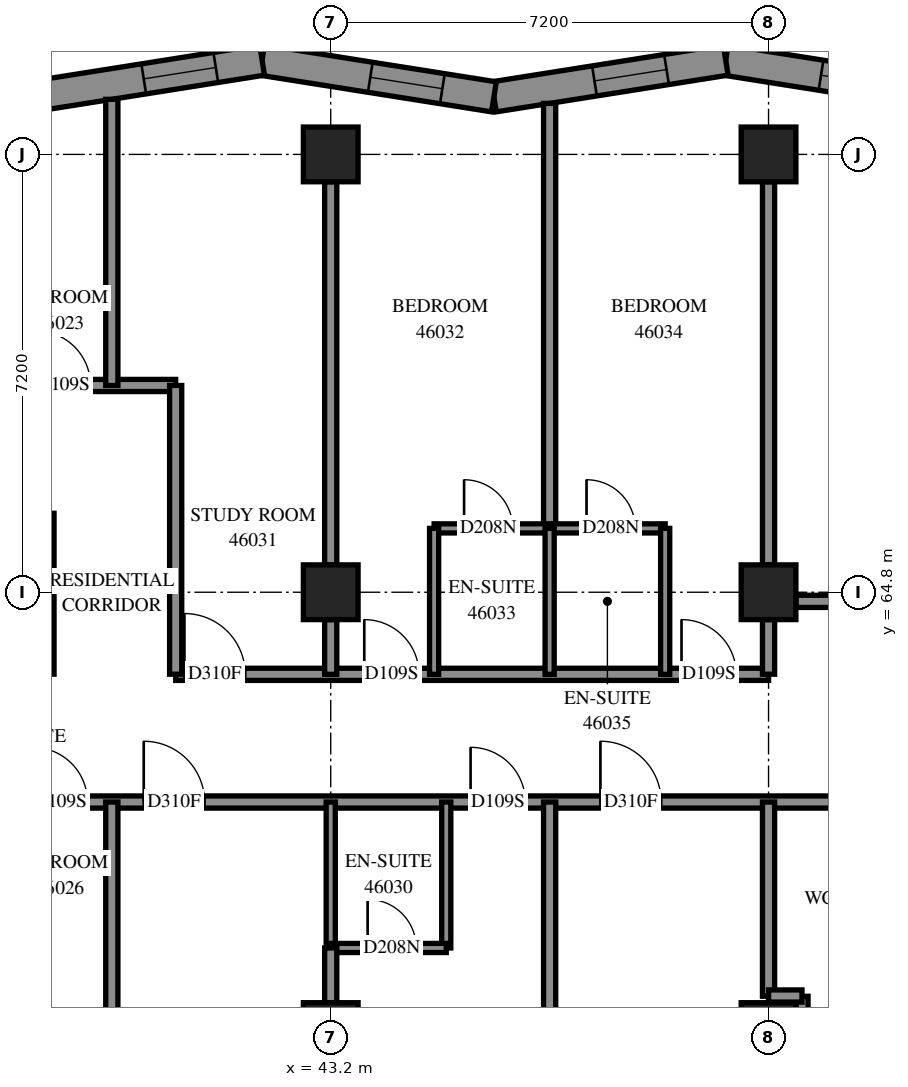
"""IFC4 building model, lengths in metres.
Left out: names, types, materials, properties, quantities, classifications, styles, units other than length and angle.
Written with IfcOpenShell. Run it as: python <this file> out.ifc"""

import sys

from ifc_helpers import new_model, si_unit, direction, frame, frame_2d, origin, origin_2d, place, context, subcontext, project, spatial, polyline, rectangle, outline, extrude, element, fill, save


model = new_model("IFC4")
c1 = context("Model", 3, precision=1e-05, world=origin(), true_north=direction((0.0, 1.0)))
c2 = subcontext(c1, "Body", "Model", "MODEL_VIEW")
j1 = project(units=[si_unit("LENGTHUNIT", "METRE"), si_unit("PLANEANGLEUNIT", "RADIAN")], contexts=[c1])
p1 = place(None, origin())
s1 = spatial("IfcSite", under=j1, at=p1, CompositionType="ELEMENT")
p2 = place(p1, origin())
s2 = spatial("IfcBuilding", under=s1, at=p2, CompositionType="ELEMENT")
p3 = place(p2, frame((0.0, 0.0, 169.4)))
s3 = spatial("IfcBuildingStorey", under=s2, at=p3, CompositionType="ELEMENT", Elevation=169.4)
for number, where, z_axis, x_axis in (
    (1, (43.2, 57.6, 0.0), (0.0, 0.0, 1.0), (1.0, 0.0, 0.0)),
    (2, (43.2, 64.8, 0.0), (0.0, 0.0, 1.0), (1.0, 0.0, 0.0)),
    (3, (43.2, 72.0, 0.0), (0.0, 0.0, 1.0), (1.0, 0.0, 0.0)),
    (4, (50.4, 57.6, 0.0), (0.0, 0.0, 1.0), (1.0, 0.0, 0.0)),
    (5, (50.4, 64.8, 0.0), (0.0, 0.0, 1.0), (1.0, 0.0, 0.0)),
    (6, (50.4, 72.0, 0.0), (0.0, 0.0, 1.0), (1.0, 0.0, 0.0)),
):
    element("IfcColumn", number, at=place(p3, frame(where, z_axis=z_axis, x_axis=x_axis)), inside=s3, PredefinedType="COLUMN", context=c2, shape_type="SweptSolid", body=[
        extrude(rectangle(XDim=0.9, YDim=0.9, at=origin_2d()), origin(), (0.0, 0.0, 1.0), 3.1),
    ])
p4 = place(p3, frame((53.509, 72.947, 0.0), z_axis=(0.0, 0.0, 1.0), x_axis=(-0.9877213372, 0.1562259905, 0.0)))
e7 = element("IfcWall", 7, at=p4, inside=s3, PredefinedType="SOLIDWALL", context=c2, shape_type="SweptSolid", body=[
    extrude(outline(polyline([(0.04, -0.25), (3.899, -0.25), (3.82, 0.25), (-0.04, 0.25), (0.04, -0.25)])), origin(), (0.0, 0.0, 1.0), 3.1),
])
p5 = place(p4, frame((1.074, 0.0, 0.45)))
e8 = element("IfcOpeningElement", 8, at=p5, cuts=e7, PredefinedType="OPENING", context=c2, shape_type="SweptSolid", body=[
    extrude(rectangle(XDim=1.2, YDim=2.5, at=frame_2d((0.6, 1.25))), frame((0.0, 0.26, 0.0), z_axis=(0.0, -1.0, 0.0), x_axis=(1.0, 0.0, 0.0)), (0.0, 0.0, 1.0), 0.52),
])
p6 = place(p3, frame((49.696, 73.55, 0.0), z_axis=(0.0, 0.0, 1.0), x_axis=(-0.9877213372, -0.1562259905, 0.0)))
e9 = element("IfcWall", 9, at=p6, inside=s3, PredefinedType="SOLIDWALL", context=c2, shape_type="SweptSolid", body=[
    extrude(outline(polyline([(-0.04, -0.25), (3.82, -0.25), (3.899, 0.25), (0.04, 0.25), (-0.04, -0.25)])), origin(), (0.0, 0.0, 1.0), 3.1),
])
p7 = place(p6, frame((0.986, 0.0, 0.45)))
e10 = element("IfcOpeningElement", 10, at=p7, cuts=e9, PredefinedType="OPENING", context=c2, shape_type="SweptSolid", body=[
    extrude(rectangle(XDim=1.2, YDim=2.5, at=frame_2d((0.6, 1.25))), frame((0.0, 0.26, 0.0), z_axis=(0.0, -1.0, 0.0), x_axis=(1.0, 0.0, 0.0)), (0.0, 0.0, 1.0), 0.52),
])
p8 = place(p3, frame((45.884, 72.947, 0.0), z_axis=(0.0, 0.0, 1.0), x_axis=(-0.9877213372, 0.1562259905, 0.0)))
e11 = element("IfcWall", 11, at=p8, inside=s3, PredefinedType="SOLIDWALL", context=c2, shape_type="SweptSolid", body=[
    extrude(outline(polyline([(0.04, -0.25), (3.899, -0.25), (3.82, 0.25), (-0.04, 0.25), (0.04, -0.25)])), origin(), (0.0, 0.0, 1.0), 3.1),
])
p9 = place(p8, frame((0.859, 0.0, 0.45)))
e12 = element("IfcOpeningElement", 12, at=p9, cuts=e11, PredefinedType="OPENING", context=c2, shape_type="SweptSolid", body=[
    extrude(rectangle(XDim=1.2, YDim=2.5, at=frame_2d((0.6, 1.25))), frame((0.0, 0.26, 0.0), z_axis=(0.0, -1.0, 0.0), x_axis=(1.0, 0.0, 0.0)), (0.0, 0.0, 1.0), 0.52),
])
p10 = place(p3, frame((42.071, 73.55, 0.0), z_axis=(0.0, 0.0, 1.0), x_axis=(-0.9877213372, -0.1562259905, 0.0)))
e13 = element("IfcWall", 13, at=p10, inside=s3, PredefinedType="SOLIDWALL", context=c2, shape_type="SweptSolid", body=[
    extrude(outline(polyline([(-0.04, -0.25), (3.82, -0.25), (3.899, 0.25), (0.04, 0.25), (-0.04, -0.25)])), origin(), (0.0, 0.0, 1.0), 3.1),
])
p11 = place(p10, frame((0.771, 0.0, 0.45)))
e14 = element("IfcOpeningElement", 14, at=p11, cuts=e13, PredefinedType="OPENING", context=c2, shape_type="SweptSolid", body=[
    extrude(rectangle(XDim=1.2, YDim=2.5, at=frame_2d((0.6, 1.25))), frame((0.0, 0.26, 0.0), z_axis=(0.0, -1.0, 0.0), x_axis=(1.0, 0.0, 0.0)), (0.0, 0.0, 1.0), 0.52),
])
p12 = place(p3, frame((21.602, 68.2, 0.0), z_axis=(0.0, 0.0, 1.0), x_axis=(1.0, 0.0, 0.0)))
e15 = element("IfcWall", 15, at=p12, inside=s3, PredefinedType="PARTITIONING", context=c2, shape_type="SweptSolid", body=[
    extrude(rectangle(XDim=19.048, YDim=0.2, at=frame_2d((9.524, 0.0))), origin(), (0.0, 0.0, 1.0), 3.1),
])
p13 = place(p12, frame((3.998, 0.0, 0.0)))
e16 = element("IfcOpeningElement", 16, at=p13, cuts=e15, PredefinedType="OPENING", context=c2, shape_type="SweptSolid", body=[
    extrude(rectangle(XDim=0.9, YDim=2.1, at=frame_2d((0.45, 1.05))), frame((0.0, 0.11, 0.0), z_axis=(0.0, -1.0, 0.0), x_axis=(1.0, 0.0, 0.0)), (0.0, 0.0, 1.0), 0.22),
])
p14 = place(p12, frame((11.084, 0.0, 0.0)))
e17 = element("IfcOpeningElement", 17, at=p14, cuts=e15, PredefinedType="OPENING", context=c2, shape_type="SweptSolid", body=[
    extrude(rectangle(XDim=1.0, YDim=2.1, at=frame_2d((0.5, 1.05))), frame((0.0, 0.11, 0.0), z_axis=(0.0, -1.0, 0.0), x_axis=(1.0, 0.0, 0.0)), (0.0, 0.0, 1.0), 0.22),
])
p15 = place(p12, frame((16.748, 0.0, 0.0)))
e18 = element("IfcOpeningElement", 18, at=p15, cuts=e15, PredefinedType="OPENING", context=c2, shape_type="SweptSolid", body=[
    extrude(rectangle(XDim=0.9, YDim=2.1, at=frame_2d((0.45, 1.05))), frame((0.0, 0.11, 0.0), z_axis=(0.0, -1.0, 0.0), x_axis=(1.0, 0.0, 0.0)), (0.0, 0.0, 1.0), 0.22),
])
p16 = place(p3, frame((36.0, 61.35, 0.0), z_axis=(0.0, 0.0, 1.0), x_axis=(1.0, 0.0, 0.0)))
e19 = element("IfcWall", 19, at=p16, inside=s3, PredefinedType="PARTITIONING", context=c2, shape_type="SweptSolid", body=[
    extrude(rectangle(XDim=16.95, YDim=0.2, at=frame_2d((8.475, 0.0))), origin(), (0.0, 0.0, 1.0), 3.1),
])
p17 = place(p16, frame((2.3, 0.0, 0.0)))
e20 = element("IfcOpeningElement", 20, at=p17, cuts=e19, PredefinedType="OPENING", context=c2, shape_type="SweptSolid", body=[
    extrude(rectangle(XDim=0.9, YDim=2.1, at=frame_2d((0.45, 1.05))), frame((0.0, 0.11, 0.0), z_axis=(0.0, -1.0, 0.0), x_axis=(1.0, 0.0, 0.0)), (0.0, 0.0, 1.0), 0.22),
])
p18 = place(p16, frame((4.125, 0.0, 0.0)))
e21 = element("IfcOpeningElement", 21, at=p18, cuts=e19, PredefinedType="OPENING", context=c2, shape_type="SweptSolid", body=[
    extrude(rectangle(XDim=1.0, YDim=2.1, at=frame_2d((0.5, 1.05))), frame((0.0, 0.11, 0.0), z_axis=(0.0, -1.0, 0.0), x_axis=(1.0, 0.0, 0.0)), (0.0, 0.0, 1.0), 0.22),
])
p19 = place(p16, frame((9.5, 0.0, 0.0)))
e22 = element("IfcOpeningElement", 22, at=p19, cuts=e19, PredefinedType="OPENING", context=c2, shape_type="SweptSolid", body=[
    extrude(rectangle(XDim=0.9, YDim=2.1, at=frame_2d((0.45, 1.05))), frame((0.0, 0.11, 0.0), z_axis=(0.0, -1.0, 0.0), x_axis=(1.0, 0.0, 0.0)), (0.0, 0.0, 1.0), 0.22),
])
p20 = place(p16, frame((11.635, 0.0, 0.0)))
e23 = element("IfcOpeningElement", 23, at=p20, cuts=e19, PredefinedType="OPENING", context=c2, shape_type="SweptSolid", body=[
    extrude(rectangle(XDim=1.0, YDim=2.1, at=frame_2d((0.5, 1.05))), frame((0.0, 0.11, 0.0), z_axis=(0.0, -1.0, 0.0), x_axis=(1.0, 0.0, 0.0)), (0.0, 0.0, 1.0), 0.22),
])
p21 = place(p16, frame((15.803, 0.0, 0.0)))
e24 = element("IfcOpeningElement", 24, at=p21, cuts=e19, PredefinedType="OPENING", context=c2, shape_type="SweptSolid", body=[
    extrude(rectangle(XDim=1.0, YDim=2.1, at=frame_2d((0.5, 1.05))), frame((0.0, 0.11, 0.0), z_axis=(0.0, -1.0, 0.0), x_axis=(1.0, 0.0, 0.0)), (0.0, 0.0, 1.0), 0.22),
])
p22 = place(p3, frame((46.8, 49.7, 0.0), z_axis=(0.0, 0.0, 1.0), x_axis=(0.0, 1.0, 0.0)))
e25 = element("IfcWall", 25, at=p22, inside=s3, PredefinedType="PARTITIONING", context=c2, shape_type="SweptSolid", body=[
    extrude(rectangle(XDim=11.65, YDim=0.2, at=frame_2d((5.825, 0.0))), origin(), (0.0, 0.0, 1.0), 3.1),
])
p23 = place(p3, frame((40.65, 63.45, 0.0), z_axis=(0.0, 0.0, 1.0), x_axis=(1.0, 0.0, 0.0)))
e26 = element("IfcWall", 26, at=p23, inside=s3, PredefinedType="PARTITIONING", context=c2, shape_type="SweptSolid", body=[
    extrude(rectangle(XDim=9.75, YDim=0.2, at=frame_2d((4.875, 0.0))), origin(), (0.0, 0.0, 1.0), 3.1),
])
p24 = place(p23, frame((0.144, 0.0, 0.0)))
e27 = element("IfcOpeningElement", 27, at=p24, cuts=e26, PredefinedType="OPENING", context=c2, shape_type="SweptSolid", body=[
    extrude(rectangle(XDim=1.0, YDim=2.1, at=frame_2d((0.5, 1.05))), frame((0.0, 0.11, 0.0), z_axis=(0.0, -1.0, 0.0), x_axis=(1.0, 0.0, 0.0)), (0.0, 0.0, 1.0), 0.22),
])
p25 = place(p23, frame((3.102, 0.0, 0.0)))
e28 = element("IfcOpeningElement", 28, at=p25, cuts=e26, PredefinedType="OPENING", context=c2, shape_type="SweptSolid", body=[
    extrude(rectangle(XDim=0.9, YDim=2.1, at=frame_2d((0.45, 1.05))), frame((0.0, 0.11, 0.0), z_axis=(0.0, -1.0, 0.0), x_axis=(1.0, 0.0, 0.0)), (0.0, 0.0, 1.0), 0.22),
])
p26 = place(p23, frame((8.319, 0.0, 0.0)))
e29 = element("IfcOpeningElement", 29, at=p26, cuts=e26, PredefinedType="OPENING", context=c2, shape_type="SweptSolid", body=[
    extrude(rectangle(XDim=0.9, YDim=2.1, at=frame_2d((0.45, 1.05))), frame((0.0, 0.11, 0.0), z_axis=(0.0, -1.0, 0.0), x_axis=(1.0, 0.0, 0.0)), (0.0, 0.0, 1.0), 0.22),
])
p27 = place(p3, frame((46.8, 65.85, 0.0), z_axis=(0.0, 0.0, 1.0), x_axis=(0.0, 1.0, 0.0)))
e30 = element("IfcWall", 30, at=p27, inside=s3, PredefinedType="PARTITIONING", context=c2, shape_type="SweptSolid", body=[
    extrude(rectangle(XDim=6.989, YDim=0.2, at=frame_2d((3.494, 0.0))), origin(), (0.0, 0.0, 1.0), 3.1),
])
for number, where, z_axis, x_axis in (
    (31, (43.2, 65.25, 0.0), (0.0, 0.0, 1.0), (0.0, 1.0, 0.0)),
    (32, (50.4, 65.25, 0.0), (0.0, 0.0, 1.0), (0.0, 1.0, 0.0)),
):
    element("IfcWall", number, at=place(p3, frame(where, z_axis=z_axis, x_axis=x_axis)), inside=s3, PredefinedType="PARTITIONING", context=c2, shape_type="SweptSolid", body=[
        extrude(rectangle(XDim=6.3, YDim=0.2, at=frame_2d((3.15, 0.0))), origin(), (0.0, 0.0, 1.0), 3.1),
    ])
p28 = place(p3, frame((40.65, 63.452, 0.0), z_axis=(0.0, 0.0, 1.0), x_axis=(0.0, 1.0, 0.0)))
e33 = element("IfcWall", 33, at=p28, inside=s3, PredefinedType="PARTITIONING", context=c2, shape_type="SweptSolid", body=[
    extrude(rectangle(XDim=4.748, YDim=0.2, at=frame_2d((2.374, 0.0))), origin(), (0.0, 0.0, 1.0), 3.1),
])
p29 = place(p3, frame((39.6, 68.2, 0.0), z_axis=(0.0, 0.0, 1.0), x_axis=(0.0, 1.0, 0.0)))
e34 = element("IfcWall", 34, at=p29, inside=s3, PredefinedType="PARTITIONING", context=c2, shape_type="SweptSolid", body=[
    extrude(rectangle(XDim=4.706, YDim=0.2, at=frame_2d((2.353, 0.0))), origin(), (0.0, 0.0, 1.0), 3.1),
])
p30 = place(p3, frame((50.85, 64.65, 0.0), z_axis=(0.0, 0.0, 1.0), x_axis=(1.0, 0.0, 0.0)))
e35 = element("IfcWall", 35, at=p30, inside=s3, PredefinedType="PARTITIONING", context=c2, shape_type="SweptSolid", body=[
    extrude(rectangle(XDim=4.65, YDim=0.2, at=frame_2d((2.325, 0.0))), origin(), (0.0, 0.0, 1.0), 3.1),
])
p31 = place(p30, frame((3.509, 0.0, 0.0)))
e36 = element("IfcOpeningElement", 36, at=p31, cuts=e35, PredefinedType="OPENING", context=c2, shape_type="SweptSolid", body=[
    extrude(rectangle(XDim=1.0, YDim=2.1, at=frame_2d((0.5, 1.05))), frame((0.0, 0.11, 0.0), z_axis=(0.0, -1.0, 0.0), x_axis=(1.0, 0.0, 0.0)), (0.0, 0.0, 1.0), 0.22),
])
p32 = place(p3, frame((39.6, 56.9, 0.0), z_axis=(0.0, 0.0, 1.0), x_axis=(0.0, 1.0, 0.0)))
e37 = element("IfcWall", 37, at=p32, inside=s3, PredefinedType="PARTITIONING", context=c2, shape_type="SweptSolid", body=[
    extrude(rectangle(XDim=4.45, YDim=0.2, at=frame_2d((2.225, 0.0))), origin(), (0.0, 0.0, 1.0), 3.1),
])
p33 = place(p3, frame((44.9, 65.85, 0.0), z_axis=(0.0, 0.0, 1.0), x_axis=(1.0, 0.0, 0.0)))
e38 = element("IfcWall", 38, at=p33, inside=s3, PredefinedType="PARTITIONING", context=c2, shape_type="SweptSolid", body=[
    extrude(rectangle(XDim=3.8, YDim=0.15, at=frame_2d((1.9, 0.0))), origin(), (0.0, 0.0, 1.0), 3.1),
])
p34 = place(p33, frame((0.493, 0.0, 0.0)))
e39 = element("IfcOpeningElement", 39, at=p34, cuts=e38, PredefinedType="OPENING", context=c2, shape_type="SweptSolid", body=[
    extrude(rectangle(XDim=0.8, YDim=2.1, at=frame_2d((0.4, 1.05))), frame((0.0, 0.085, 0.0), z_axis=(0.0, -1.0, 0.0), x_axis=(1.0, 0.0, 0.0)), (0.0, 0.0, 1.0), 0.17),
])
p35 = place(p33, frame((2.507, 0.0, 0.0)))
e40 = element("IfcOpeningElement", 40, at=p35, cuts=e38, PredefinedType="OPENING", context=c2, shape_type="SweptSolid", body=[
    extrude(rectangle(XDim=0.8, YDim=2.1, at=frame_2d((0.4, 1.05))), frame((0.0, 0.085, 0.0), z_axis=(0.0, -1.0, 0.0), x_axis=(1.0, 0.0, 0.0)), (0.0, 0.0, 1.0), 0.17),
])
p36 = place(p3, frame((50.4, 58.156, 0.0), z_axis=(0.0, 0.0, 1.0), x_axis=(0.0, 1.0, 0.0)))
e41 = element("IfcWall", 41, at=p36, inside=s3, PredefinedType="PARTITIONING", context=c2, shape_type="SweptSolid", body=[
    extrude(rectangle(XDim=3.194, YDim=0.2, at=frame_2d((1.597, 0.0))), origin(), (0.0, 0.0, 1.0), 3.1),
])
p37 = place(p3, frame((38.55, 63.452, 0.0), z_axis=(0.0, 0.0, 1.0), x_axis=(0.0, 1.0, 0.0)))
e42 = element("IfcWall", 42, at=p37, inside=s3, PredefinedType="PARTITIONING", context=c2, shape_type="SweptSolid", body=[
    extrude(rectangle(XDim=2.646, YDim=0.2, at=frame_2d((1.323, 0.0))), origin(), (0.0, 0.0, 1.0), 3.1),
])
for number, where, z_axis, x_axis in (
    (43, (45.1, 58.95, 0.0), (0.0, 0.0, 1.0), (0.0, 1.0, 0.0)),
    (44, (43.2, 58.95, 0.0), (0.0, 0.0, 1.0), (0.0, 1.0, 0.0)),
    (45, (44.9, 63.45, 0.0), (0.0, 0.0, 1.0), (0.0, 1.0, 0.0)),
    (46, (46.8, 63.45, 0.0), (0.0, 0.0, 1.0), (0.0, 1.0, 0.0)),
    (47, (48.7, 63.45, 0.0), (0.0, 0.0, 1.0), (0.0, 1.0, 0.0)),
):
    element("IfcWall", number, at=place(p3, frame(where, z_axis=z_axis, x_axis=x_axis)), inside=s3, PredefinedType="PARTITIONING", context=c2, shape_type="SweptSolid", body=[
        extrude(rectangle(XDim=2.4, YDim=0.15, at=frame_2d((1.2, 0.0))), origin(), (0.0, 0.0, 1.0), 3.1),
    ])
p38 = place(p3, frame((43.2, 58.95, 0.0), z_axis=(0.0, 0.0, 1.0), x_axis=(1.0, 0.0, 0.0)))
e48 = element("IfcWall", 48, at=p38, inside=s3, PredefinedType="PARTITIONING", context=c2, shape_type="SweptSolid", body=[
    extrude(rectangle(XDim=1.9, YDim=0.15, at=frame_2d((0.95, 0.0))), origin(), (0.0, 0.0, 1.0), 3.1),
])
p39 = place(p38, frame((0.607, 0.0, 0.0)))
e49 = element("IfcOpeningElement", 49, at=p39, cuts=e48, PredefinedType="OPENING", context=c2, shape_type="SweptSolid", body=[
    extrude(rectangle(XDim=0.8, YDim=2.1, at=frame_2d((0.4, 1.05))), frame((0.0, 0.085, 0.0), z_axis=(0.0, -1.0, 0.0), x_axis=(1.0, 0.0, 0.0)), (0.0, 0.0, 1.0), 0.17),
])
p40 = place(p3, frame((50.95, 57.044, 0.0), z_axis=(0.0, 0.0, 1.0), x_axis=(0.0, 1.0, 0.0)))
e50 = element("IfcWall", 50, at=p40, inside=s3, PredefinedType="PARTITIONING", context=c2, shape_type="SweptSolid", body=[
    extrude(rectangle(XDim=1.112, YDim=0.2, at=frame_2d((0.556, 0.0))), origin(), (0.0, 0.0, 1.0), 3.1),
])
for number, where, z_axis, x_axis in (
    (51, (43.2, 58.05, 0.0), (0.0, 0.0, 1.0), (0.0, 1.0, 0.0)),
    (52, (43.2, 63.45, 0.0), (0.0, 0.0, 1.0), (0.0, 1.0, 0.0)),
):
    element("IfcWall", number, at=place(p3, frame(where, z_axis=z_axis, x_axis=x_axis)), inside=s3, PredefinedType="PARTITIONING", context=c2, shape_type="SweptSolid", body=[
        extrude(rectangle(XDim=0.9, YDim=0.2, at=frame_2d((0.45, 0.0))), origin(), (0.0, 0.0, 1.0), 3.1),
    ])
p41 = place(p3, frame((50.4, 63.452, 0.0), z_axis=(0.0, 0.0, 1.0), x_axis=(0.0, 1.0, 0.0)))
e53 = element("IfcWall", 53, at=p41, inside=s3, PredefinedType="PARTITIONING", context=c2, shape_type="SweptSolid", body=[
    extrude(rectangle(XDim=0.898, YDim=0.2, at=frame_2d((0.449, 0.0))), origin(), (0.0, 0.0, 1.0), 3.1),
])
p42 = place(p3, frame((50.4, 58.16, 0.0), z_axis=(0.0, 0.0, 1.0), x_axis=(1.0, 0.0, 0.0)))
e54 = element("IfcWall", 54, at=p42, inside=s3, PredefinedType="PARTITIONING", context=c2, shape_type="SweptSolid", body=[
    extrude(rectangle(XDim=0.55, YDim=0.2, at=frame_2d((0.275, 0.0))), origin(), (0.0, 0.0, 1.0), 3.1),
])
p43 = place(p5, origin())
e55 = element("IfcWindow", 55, at=p43, inside=s3, PartitioningType="SINGLE_PANEL", PredefinedType="WINDOW", context=c2, shape_type="SweptSolid", body=[
    extrude(rectangle(XDim=1.2, YDim=2.5, at=frame_2d((0.6, 1.25))), frame((0.0, 0.18, 0.0), z_axis=(0.0, -1.0, 0.0), x_axis=(1.0, 0.0, 0.0)), (0.0, 0.0, 1.0), 0.06),
])
fill(e8, e55)
p44 = place(p7, origin())
e56 = element("IfcWindow", 56, at=p44, inside=s3, PartitioningType="SINGLE_PANEL", PredefinedType="WINDOW", context=c2, shape_type="SweptSolid", body=[
    extrude(rectangle(XDim=1.2, YDim=2.5, at=frame_2d((0.6, 1.25))), frame((0.0, 0.18, 0.0), z_axis=(0.0, -1.0, 0.0), x_axis=(1.0, 0.0, 0.0)), (0.0, 0.0, 1.0), 0.06),
])
fill(e10, e56)
p45 = place(p9, origin())
e57 = element("IfcWindow", 57, at=p45, inside=s3, PartitioningType="SINGLE_PANEL", PredefinedType="WINDOW", context=c2, shape_type="SweptSolid", body=[
    extrude(rectangle(XDim=1.2, YDim=2.5, at=frame_2d((0.6, 1.25))), frame((0.0, 0.18, 0.0), z_axis=(0.0, -1.0, 0.0), x_axis=(1.0, 0.0, 0.0)), (0.0, 0.0, 1.0), 0.06),
])
fill(e12, e57)
p46 = place(p11, origin())
e58 = element("IfcWindow", 58, at=p46, inside=s3, PartitioningType="SINGLE_PANEL", PredefinedType="WINDOW", context=c2, shape_type="SweptSolid", body=[
    extrude(rectangle(XDim=1.2, YDim=2.5, at=frame_2d((0.6, 1.25))), frame((0.0, 0.18, 0.0), z_axis=(0.0, -1.0, 0.0), x_axis=(1.0, 0.0, 0.0)), (0.0, 0.0, 1.0), 0.06),
])
fill(e14, e58)
p47 = place(p15, origin())
e59 = element("IfcDoor", 59, at=p47, inside=s3, OperationType="SINGLE_SWING_RIGHT", PredefinedType="DOOR", context=c2, shape_type="SweptSolid", body=[
    extrude(rectangle(XDim=0.9, YDim=2.1, at=frame_2d((0.45, 1.05))), frame((0.0, 0.025, 0.0), z_axis=(0.0, -1.0, 0.0), x_axis=(1.0, 0.0, 0.0)), (0.0, 0.0, 1.0), 0.05),
])
fill(e18, e59)
p48 = place(p17, origin())
e60 = element("IfcDoor", 60, at=p48, inside=s3, OperationType="SINGLE_SWING_LEFT", PredefinedType="DOOR", context=c2, shape_type="SweptSolid", body=[
    extrude(rectangle(XDim=0.9, YDim=2.1, at=frame_2d((0.45, 1.05))), frame((0.0, 0.025, 0.0), z_axis=(0.0, -1.0, 0.0), x_axis=(1.0, 0.0, 0.0)), (0.0, 0.0, 1.0), 0.05),
])
fill(e20, e60)
p49 = place(p18, origin())
e61 = element("IfcDoor", 61, at=p49, inside=s3, OperationType="SINGLE_SWING_RIGHT", PredefinedType="DOOR", context=c2, shape_type="SweptSolid", body=[
    extrude(rectangle(XDim=1.0, YDim=2.1, at=frame_2d((0.5, 1.05))), frame((0.0, 0.025, 0.0), z_axis=(0.0, -1.0, 0.0), x_axis=(1.0, 0.0, 0.0)), (0.0, 0.0, 1.0), 0.05),
])
fill(e21, e61)
p50 = place(p19, origin())
e62 = element("IfcDoor", 62, at=p50, inside=s3, OperationType="SINGLE_SWING_LEFT", PredefinedType="DOOR", context=c2, shape_type="SweptSolid", body=[
    extrude(rectangle(XDim=0.9, YDim=2.1, at=frame_2d((0.45, 1.05))), frame((0.0, 0.025, 0.0), z_axis=(0.0, -1.0, 0.0), x_axis=(1.0, 0.0, 0.0)), (0.0, 0.0, 1.0), 0.05),
])
fill(e22, e62)
p51 = place(p39, origin())
e63 = element("IfcDoor", 63, at=p51, inside=s3, OperationType="SINGLE_SWING_RIGHT", PredefinedType="DOOR", context=c2, shape_type="SweptSolid", body=[
    extrude(rectangle(XDim=0.8, YDim=2.1, at=frame_2d((0.4, 1.05))), frame((0.0, 0.025, 0.0), z_axis=(0.0, -1.0, 0.0), x_axis=(1.0, 0.0, 0.0)), (0.0, 0.0, 1.0), 0.05),
])
fill(e49, e63)
p52 = place(p24, origin())
e64 = element("IfcDoor", 64, at=p52, inside=s3, OperationType="SINGLE_SWING_LEFT", PredefinedType="DOOR", context=c2, shape_type="SweptSolid", body=[
    extrude(rectangle(XDim=1.0, YDim=2.1, at=frame_2d((0.5, 1.05))), frame((0.0, 0.025, 0.0), z_axis=(0.0, -1.0, 0.0), x_axis=(1.0, 0.0, 0.0)), (0.0, 0.0, 1.0), 0.05),
])
fill(e27, e64)
p53 = place(p25, origin())
e65 = element("IfcDoor", 65, at=p53, inside=s3, OperationType="SINGLE_SWING_RIGHT", PredefinedType="DOOR", context=c2, shape_type="SweptSolid", body=[
    extrude(rectangle(XDim=0.9, YDim=2.1, at=frame_2d((0.45, 1.05))), frame((0.0, 0.025, 0.0), z_axis=(0.0, -1.0, 0.0), x_axis=(1.0, 0.0, 0.0)), (0.0, 0.0, 1.0), 0.05),
])
fill(e28, e65)
p54 = place(p34, origin())
e66 = element("IfcDoor", 66, at=p54, inside=s3, OperationType="SINGLE_SWING_RIGHT", PredefinedType="DOOR", context=c2, shape_type="SweptSolid", body=[
    extrude(rectangle(XDim=0.8, YDim=2.1, at=frame_2d((0.4, 1.05))), frame((0.0, 0.025, 0.0), z_axis=(0.0, -1.0, 0.0), x_axis=(1.0, 0.0, 0.0)), (0.0, 0.0, 1.0), 0.05),
])
fill(e39, e66)
p55 = place(p26, origin())
e67 = element("IfcDoor", 67, at=p55, inside=s3, OperationType="SINGLE_SWING_LEFT", PredefinedType="DOOR", context=c2, shape_type="SweptSolid", body=[
    extrude(rectangle(XDim=0.9, YDim=2.1, at=frame_2d((0.45, 1.05))), frame((0.0, 0.025, 0.0), z_axis=(0.0, -1.0, 0.0), x_axis=(1.0, 0.0, 0.0)), (0.0, 0.0, 1.0), 0.05),
])
fill(e29, e67)
p56 = place(p35, origin())
e68 = element("IfcDoor", 68, at=p56, inside=s3, OperationType="SINGLE_SWING_RIGHT", PredefinedType="DOOR", context=c2, shape_type="SweptSolid", body=[
    extrude(rectangle(XDim=0.8, YDim=2.1, at=frame_2d((0.4, 1.05))), frame((0.0, 0.025, 0.0), z_axis=(0.0, -1.0, 0.0), x_axis=(1.0, 0.0, 0.0)), (0.0, 0.0, 1.0), 0.05),
])
fill(e40, e68)
p57 = place(p20, origin())
e69 = element("IfcDoor", 69, at=p57, inside=s3, OperationType="SINGLE_SWING_RIGHT", PredefinedType="DOOR", context=c2, shape_type="SweptSolid", body=[
    extrude(rectangle(XDim=1.0, YDim=2.1, at=frame_2d((0.5, 1.05))), frame((0.0, 0.025, 0.0), z_axis=(0.0, -1.0, 0.0), x_axis=(1.0, 0.0, 0.0)), (0.0, 0.0, 1.0), 0.05),
])
fill(e23, e69)
save(model, sys.argv[1])
